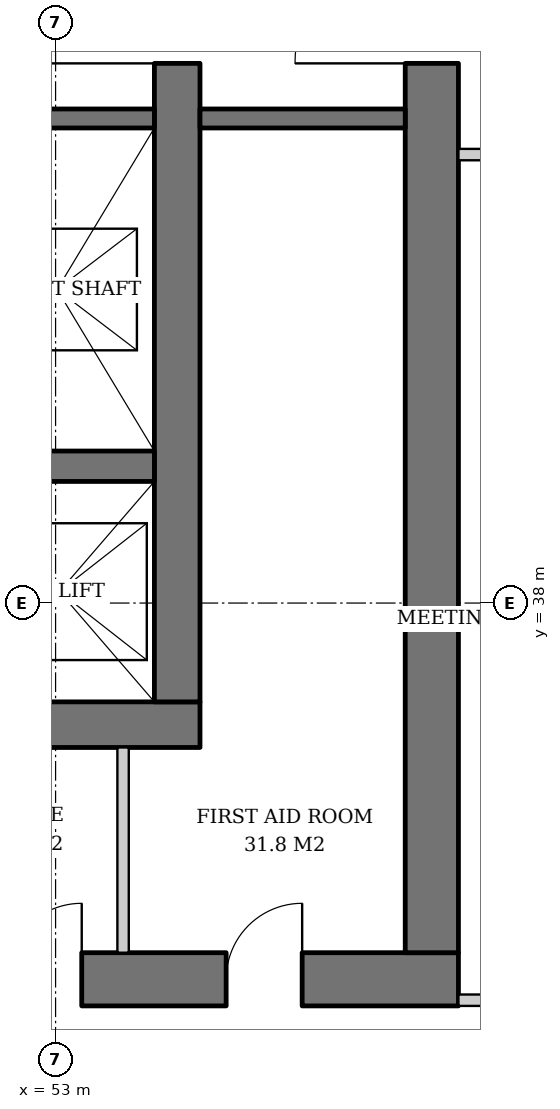
"""IFC4 building model, lengths in metres.
Left out: names, types, materials, properties, quantities, classifications, styles, units other than length and angle.
Written with IfcOpenShell. Run it as: python <this file> out.ifc"""

import sys

from ifc_helpers import new_model, si_unit, direction, frame, frame_2d, origin, place, context, subcontext, project, spatial, rectangle, extrude, element, fill, save


model = new_model("IFC4")
c1 = context("Model", 3, precision=1e-05, world=origin(), true_north=direction((0.0, 1.0)))
c2 = subcontext(c1, "Body", "Model", "MODEL_VIEW")
j1 = project(units=[si_unit("LENGTHUNIT", "METRE"), si_unit("PLANEANGLEUNIT", "RADIAN")], contexts=[c1])
p1 = place(None, origin())
s1 = spatial("IfcSite", under=j1, at=p1, CompositionType="ELEMENT")
p2 = place(p1, origin())
s2 = spatial("IfcBuilding", under=s1, at=p2, CompositionType="ELEMENT")
p3 = place(p2, frame((0.0, 0.0, 93.2)))
s3 = spatial("IfcBuildingStorey", under=s2, at=p3, CompositionType="ELEMENT", Elevation=93.2)
p4 = place(p3, frame((35.1, 36.4, 0.0), z_axis=(0.0, 0.0, 1.0), x_axis=(1.0, 0.0, 0.0)))
e1 = element("IfcWall", 1, at=p4, inside=s3, PredefinedType="SHEAR", context=c2, shape_type="SweptSolid", body=[
    extrude(rectangle(XDim=19.8, YDim=0.6, at=frame_2d((9.9, 0.0))), origin(), (0.0, 0.0, 1.0), 3.8),
])
p5 = place(p4, frame((3.9, 0.0, 0.0)))
e2 = element("IfcOpeningElement", 2, at=p5, cuts=e1, PredefinedType="OPENING", context=c2, shape_type="SweptSolid", body=[
    extrude(rectangle(XDim=1.0, YDim=2.1, at=frame_2d((0.5, 1.05))), frame((0.0, 0.31, 0.0), z_axis=(0.0, -1.0, 0.0), x_axis=(1.0, 0.0, 0.0)), (0.0, 0.0, 1.0), 0.62),
])
p6 = place(p4, frame((15.35, 0.0, 0.0)))
e3 = element("IfcOpeningElement", 3, at=p6, cuts=e1, PredefinedType="OPENING", context=c2, shape_type="SweptSolid", body=[
    extrude(rectangle(XDim=1.0, YDim=2.1, at=frame_2d((0.5, 1.05))), frame((0.0, 0.31, 0.0), z_axis=(0.0, -1.0, 0.0), x_axis=(1.0, 0.0, 0.0)), (0.0, 0.0, 1.0), 0.62),
])
p7 = place(p3, frame((54.6, 36.7, 0.0), z_axis=(0.0, 0.0, 1.0), x_axis=(0.0, 1.0, 0.0)))
e4 = element("IfcWall", 4, at=p7, inside=s3, PredefinedType="SHEAR", context=c2, shape_type="SweptSolid", body=[
    extrude(rectangle(XDim=18.6, YDim=0.6, at=frame_2d((9.3, 0.0))), origin(), (0.0, 0.0, 1.0), 3.8),
])
p8 = place(p7, frame((8.4, 0.0, 0.0)))
e5 = element("IfcOpeningElement", 5, at=p8, cuts=e4, PredefinedType="OPENING", context=c2, shape_type="SweptSolid", body=[
    extrude(rectangle(XDim=1.8, YDim=2.4, at=frame_2d((0.9, 1.2))), frame((0.0, 0.31, 0.0), z_axis=(0.0, -1.0, 0.0), x_axis=(1.0, 0.0, 0.0)), (0.0, 0.0, 1.0), 0.62),
])
p9 = place(p3, frame((31.7, 33.05, 0.0), z_axis=(0.0, 0.0, 1.0), x_axis=(1.0, 0.0, 0.0)))
e6 = element("IfcWall", 6, at=p9, inside=s3, PredefinedType="SHEAR", context=c2, shape_type="SweptSolid", body=[
    extrude(rectangle(XDim=26.6, YDim=0.7, at=frame_2d((13.3, 0.0))), origin(), (0.0, 0.0, 1.0), 3.8),
])
p10 = place(p9, frame((7.3, 0.0, 0.0)))
e7 = element("IfcOpeningElement", 7, at=p10, cuts=e6, PredefinedType="OPENING", context=c2, shape_type="SweptSolid", body=[
    extrude(rectangle(XDim=1.0, YDim=2.1, at=frame_2d((0.5, 1.05))), frame((0.0, 0.36, 0.0), z_axis=(0.0, -1.0, 0.0), x_axis=(1.0, 0.0, 0.0)), (0.0, 0.0, 1.0), 0.72),
])
p11 = place(p9, frame((18.75, 0.0, 0.0)))
e8 = element("IfcOpeningElement", 8, at=p11, cuts=e6, PredefinedType="OPENING", context=c2, shape_type="SweptSolid", body=[
    extrude(rectangle(XDim=1.0, YDim=2.1, at=frame_2d((0.5, 1.05))), frame((0.0, 0.36, 0.0), z_axis=(0.0, -1.0, 0.0), x_axis=(1.0, 0.0, 0.0)), (0.0, 0.0, 1.0), 0.72),
])
p12 = place(p9, frame((1.85, 0.0, 0.0)))
e9 = element("IfcOpeningElement", 9, at=p12, cuts=e6, PredefinedType="OPENING", context=c2, shape_type="SweptSolid", body=[
    extrude(rectangle(XDim=1.0, YDim=2.1, at=frame_2d((0.5, 1.05))), frame((0.0, 0.36, 0.0), z_axis=(0.0, -1.0, 0.0), x_axis=(1.0, 0.0, 0.0)), (0.0, 0.0, 1.0), 0.72),
])
p13 = place(p9, frame((4.7, 0.0, 0.0)))
e10 = element("IfcOpeningElement", 10, at=p13, cuts=e6, PredefinedType="OPENING", context=c2, shape_type="SweptSolid", body=[
    extrude(rectangle(XDim=1.0, YDim=2.1, at=frame_2d((0.5, 1.05))), frame((0.0, 0.36, 0.0), z_axis=(0.0, -1.0, 0.0), x_axis=(1.0, 0.0, 0.0)), (0.0, 0.0, 1.0), 0.72),
])
p14 = place(p9, frame((12.44, 0.0, 0.0)))
e11 = element("IfcOpeningElement", 11, at=p14, cuts=e6, PredefinedType="OPENING", context=c2, shape_type="SweptSolid", body=[
    extrude(rectangle(XDim=1.0, YDim=2.1, at=frame_2d((0.5, 1.05))), frame((0.0, 0.36, 0.0), z_axis=(0.0, -1.0, 0.0), x_axis=(1.0, 0.0, 0.0)), (0.0, 0.0, 1.0), 0.72),
])
p15 = place(p9, frame((20.644, 0.0, 0.0)))
e12 = element("IfcOpeningElement", 12, at=p15, cuts=e6, PredefinedType="OPENING", context=c2, shape_type="SweptSolid", body=[
    extrude(rectangle(XDim=1.0, YDim=2.1, at=frame_2d((0.5, 1.05))), frame((0.0, 0.36, 0.0), z_axis=(0.0, -1.0, 0.0), x_axis=(1.0, 0.0, 0.0)), (0.0, 0.0, 1.0), 0.72),
])
p16 = place(p9, frame((23.544, 0.0, 0.0)))
e13 = element("IfcOpeningElement", 13, at=p16, cuts=e6, PredefinedType="OPENING", context=c2, shape_type="SweptSolid", body=[
    extrude(rectangle(XDim=1.0, YDim=2.1, at=frame_2d((0.5, 1.05))), frame((0.0, 0.36, 0.0), z_axis=(0.0, -1.0, 0.0), x_axis=(1.0, 0.0, 0.0)), (0.0, 0.0, 1.0), 0.72),
])
p17 = place(p3, frame((57.95, 33.4, 0.0), z_axis=(0.0, 0.0, 1.0), x_axis=(0.0, 1.0, 0.0)))
e14 = element("IfcWall", 14, at=p17, inside=s3, PredefinedType="SHEAR", context=c2, shape_type="SweptSolid", body=[
    extrude(rectangle(XDim=25.2, YDim=0.7, at=frame_2d((12.6, 0.0))), origin(), (0.0, 0.0, 1.0), 3.8),
])
p18 = place(p17, frame((11.7, 0.0, 0.0)))
e15 = element("IfcOpeningElement", 15, at=p18, cuts=e14, PredefinedType="OPENING", context=c2, shape_type="SweptSolid", body=[
    extrude(rectangle(XDim=1.8, YDim=2.4, at=frame_2d((0.9, 1.2))), frame((0.0, 0.36, 0.0), z_axis=(0.0, -1.0, 0.0), x_axis=(1.0, 0.0, 0.0)), (0.0, 0.0, 1.0), 0.72),
])
p19 = place(p3, frame((35.7, 39.8, 0.0), z_axis=(0.0, 0.0, 1.0), x_axis=(1.0, 0.0, 0.0)))
e16 = element("IfcWall", 16, at=p19, inside=s3, PredefinedType="SHEAR", context=c2, shape_type="SweptSolid", body=[
    extrude(rectangle(XDim=18.6, YDim=0.4, at=frame_2d((9.3, 0.0))), origin(), (0.0, 0.0, 1.0), 3.8),
])
p20 = place(p3, frame((48.93, 44.375, 0.0), z_axis=(0.0, 0.0, 1.0), x_axis=(1.0, 0.0, 0.0)))
e17 = element("IfcWall", 17, at=p20, inside=s3, PredefinedType="SHEAR", context=c2, shape_type="SweptSolid", body=[
    extrude(rectangle(XDim=5.37, YDim=0.25, at=frame_2d((2.685, 0.0))), origin(), (0.0, 0.0, 1.0), 3.8),
])
p21 = place(p3, frame((54.9, 44.375, 0.0), z_axis=(0.0, 0.0, 1.0), x_axis=(1.0, 0.0, 0.0)))
e18 = element("IfcWall", 18, at=p21, inside=s3, PredefinedType="SOLIDWALL", context=c2, shape_type="SweptSolid", body=[
    extrude(rectangle(XDim=2.7, YDim=0.25, at=frame_2d((1.35, 0.0))), origin(), (0.0, 0.0, 1.0), 3.62),
])
p22 = place(p3, frame((53.888, 33.4, 0.0), z_axis=(0.0, 0.0, 1.0), x_axis=(0.0, 1.0, 0.0)))
e19 = element("IfcWall", 19, at=p22, inside=s3, PredefinedType="SOLIDWALL", context=c2, shape_type="SweptSolid", body=[
    extrude(rectangle(XDim=2.7, YDim=0.15, at=frame_2d((1.35, 0.0))), origin(), (0.0, 0.0, 1.0), 3.62),
])
for number, where, z_axis, x_axis in (
    (20, (58.3, 32.775, 0.0), (0.0, 0.0, 1.0), (1.0, 0.0, 0.0)),
    (21, (58.3, 43.9, 0.0), (0.0, 0.0, 1.0), (1.0, 0.0, 0.0)),
):
    element("IfcWall", number, at=place(p3, frame(where, z_axis=z_axis, x_axis=x_axis)), inside=s3, PredefinedType="PARTITIONING", context=c2, shape_type="SweptSolid", body=[
        extrude(rectangle(XDim=1.725, YDim=0.15, at=frame_2d((0.862, 0.0))), origin(), (0.0, 0.0, 1.0), 3.62),
    ])
p23 = place(p8, origin())
e22 = element("IfcDoor", 22, at=p23, inside=s3, OperationType="DOUBLE_DOOR_SINGLE_SWING", PredefinedType="DOOR", context=c2, shape_type="SweptSolid", body=[
    extrude(rectangle(XDim=1.8, YDim=2.4, at=frame_2d((0.9, 1.2))), frame((0.0, 0.025, 0.0), z_axis=(0.0, -1.0, 0.0), x_axis=(1.0, 0.0, 0.0)), (0.0, 0.0, 1.0), 0.05),
])
fill(e5, e22)
p24 = place(p18, origin())
e23 = element("IfcDoor", 23, at=p24, inside=s3, OperationType="DOUBLE_DOOR_SINGLE_SWING", PredefinedType="DOOR", context=c2, shape_type="SweptSolid", body=[
    extrude(rectangle(XDim=1.8, YDim=2.4, at=frame_2d((0.9, 1.2))), frame((0.0, 0.025, 0.0), z_axis=(0.0, -1.0, 0.0), x_axis=(1.0, 0.0, 0.0)), (0.0, 0.0, 1.0), 0.05),
])
fill(e15, e23)
p25 = place(p15, origin())
e24 = element("IfcDoor", 24, at=p25, inside=s3, OperationType="SINGLE_SWING_RIGHT", PredefinedType="DOOR", context=c2, shape_type="SweptSolid", body=[
    extrude(rectangle(XDim=1.0, YDim=2.1, at=frame_2d((0.5, 1.05))), frame((0.0, 0.34, 0.0), z_axis=(0.0, -1.0, 0.0), x_axis=(1.0, 0.0, 0.0)), (0.0, 0.0, 1.0), 0.05),
])
fill(e12, e24)
p26 = place(p16, origin())
e25 = element("IfcDoor", 25, at=p26, inside=s3, OperationType="SINGLE_SWING_RIGHT", PredefinedType="DOOR", context=c2, shape_type="SweptSolid", body=[
    extrude(rectangle(XDim=1.0, YDim=2.1, at=frame_2d((0.5, 1.05))), frame((0.0, 0.34, 0.0), z_axis=(0.0, -1.0, 0.0), x_axis=(1.0, 0.0, 0.0)), (0.0, 0.0, 1.0), 0.05),
])
fill(e13, e25)
save(model, sys.argv[1])
